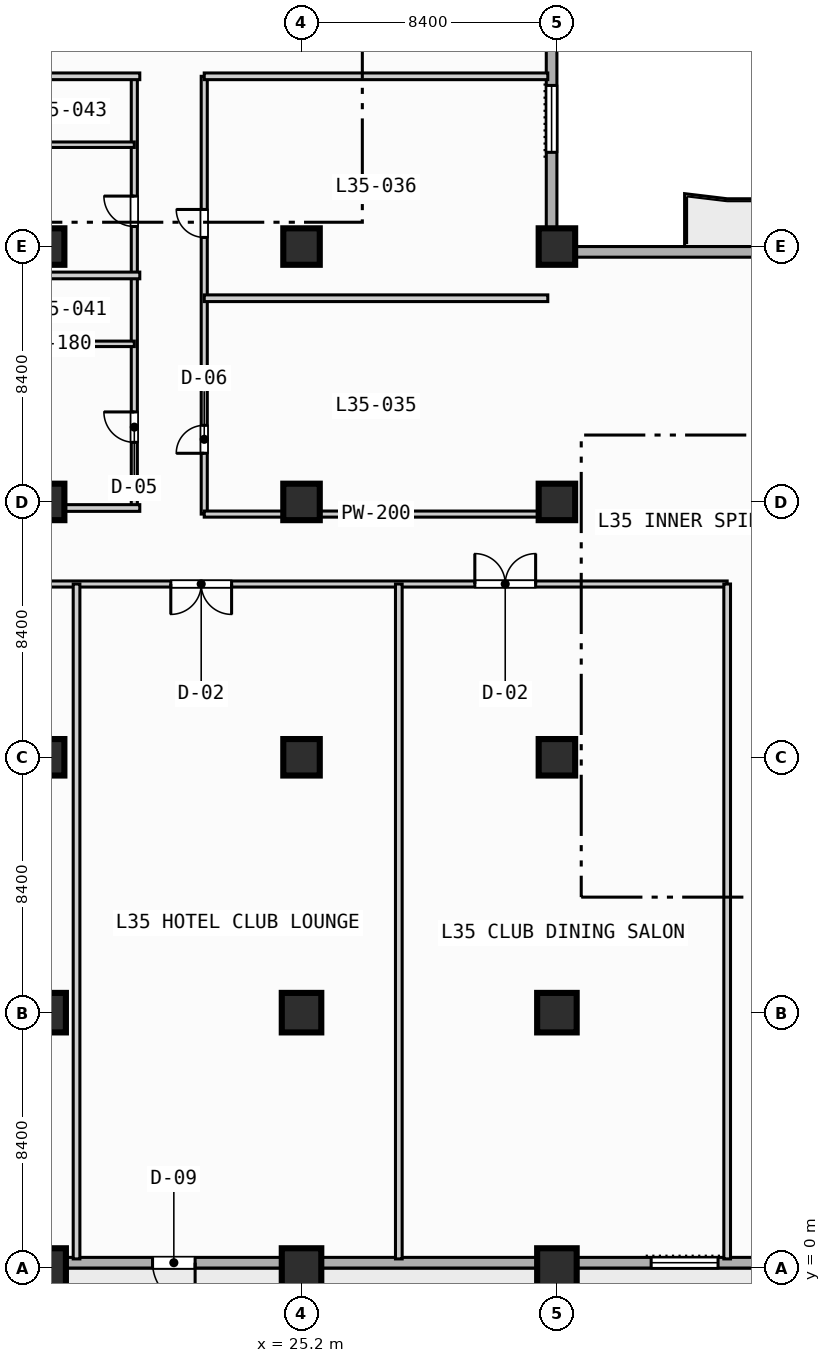
"""IFC4 building model, lengths in metres.
Left out: names, types, materials, properties, quantities, classifications, styles, units other than length and angle.
Written with IfcOpenShell. Run it as: python <this file> out.ifc"""

import sys

from ifc_helpers import new_model, si_unit, direction, frame, frame_2d, origin, origin_2d, place, context, subcontext, project, spatial, rectangle, extrude, element, fill, save


model = new_model("IFC4")
c1 = context("Model", 3, precision=1e-05, world=origin(), true_north=direction((0.0, 1.0)))
c2 = subcontext(c1, "Body", "Model", "MODEL_VIEW")
j1 = project(units=[si_unit("LENGTHUNIT", "METRE"), si_unit("PLANEANGLEUNIT", "RADIAN")], contexts=[c1])
p1 = place(None, origin())
s1 = spatial("IfcSite", under=j1, at=p1, CompositionType="ELEMENT")
p2 = place(p1, origin())
s2 = spatial("IfcBuilding", under=s1, at=p2, CompositionType="ELEMENT")
p3 = place(p2, frame((0.0, 0.0, 145.6)))
s3 = spatial("IfcBuildingStorey", under=s2, at=p3, CompositionType="ELEMENT", Elevation=145.6)
for number, where, z_axis, x_axis in (
    (1, (16.8, 0.0, 0.0), (0.0, 0.0, 1.0), (1.0, 0.0, 0.0)),
    (2, (16.8, 8.4, 0.0), (0.0, 0.0, 1.0), (1.0, 0.0, 0.0)),
):
    element("IfcColumn", number, at=place(p3, frame(where, z_axis=z_axis, x_axis=x_axis)), inside=s3, PredefinedType="COLUMN", context=c2, shape_type="SweptSolid", body=[
        extrude(rectangle(XDim=1.3, YDim=1.3, at=origin_2d()), origin(), (0.0, 0.0, 1.0), 3.8),
    ])
for number, where, z_axis, x_axis in (
    (3, (16.8, 16.8, 0.0), (0.0, 0.0, 1.0), (1.0, 0.0, 0.0)),
    (4, (16.8, 25.2, 0.0), (0.0, 0.0, 1.0), (1.0, 0.0, 0.0)),
    (5, (16.8, 33.6, 0.0), (0.0, 0.0, 1.0), (1.0, 0.0, 0.0)),
):
    element("IfcColumn", number, at=place(p3, frame(where, z_axis=z_axis, x_axis=x_axis)), inside=s3, PredefinedType="COLUMN", context=c2, shape_type="SweptSolid", body=[
        extrude(rectangle(XDim=1.2, YDim=1.2, at=origin_2d()), origin(), (0.0, 0.0, 1.0), 3.8),
    ])
for number, where, z_axis, x_axis in (
    (6, (25.2, 0.0, 0.0), (0.0, 0.0, 1.0), (1.0, 0.0, 0.0)),
    (7, (25.2, 8.4, 0.0), (0.0, 0.0, 1.0), (1.0, 0.0, 0.0)),
):
    element("IfcColumn", number, at=place(p3, frame(where, z_axis=z_axis, x_axis=x_axis)), inside=s3, PredefinedType="COLUMN", context=c2, shape_type="SweptSolid", body=[
        extrude(rectangle(XDim=1.3, YDim=1.3, at=origin_2d()), origin(), (0.0, 0.0, 1.0), 3.8),
    ])
for number, where, z_axis, x_axis in (
    (8, (25.2, 16.8, 0.0), (0.0, 0.0, 1.0), (1.0, 0.0, 0.0)),
    (9, (25.2, 25.2, 0.0), (0.0, 0.0, 1.0), (1.0, 0.0, 0.0)),
    (10, (25.2, 33.6, 0.0), (0.0, 0.0, 1.0), (1.0, 0.0, 0.0)),
):
    element("IfcColumn", number, at=place(p3, frame(where, z_axis=z_axis, x_axis=x_axis)), inside=s3, PredefinedType="COLUMN", context=c2, shape_type="SweptSolid", body=[
        extrude(rectangle(XDim=1.2, YDim=1.2, at=origin_2d()), origin(), (0.0, 0.0, 1.0), 3.8),
    ])
for number, where, z_axis, x_axis in (
    (11, (33.6, 0.0, 0.0), (0.0, 0.0, 1.0), (1.0, 0.0, 0.0)),
    (12, (33.6, 8.4, 0.0), (0.0, 0.0, 1.0), (1.0, 0.0, 0.0)),
):
    element("IfcColumn", number, at=place(p3, frame(where, z_axis=z_axis, x_axis=x_axis)), inside=s3, PredefinedType="COLUMN", context=c2, shape_type="SweptSolid", body=[
        extrude(rectangle(XDim=1.3, YDim=1.3, at=origin_2d()), origin(), (0.0, 0.0, 1.0), 3.8),
    ])
for number, where, z_axis, x_axis in (
    (13, (33.6, 16.8, 0.0), (0.0, 0.0, 1.0), (1.0, 0.0, 0.0)),
    (14, (33.6, 25.2, 0.0), (0.0, 0.0, 1.0), (1.0, 0.0, 0.0)),
    (15, (33.6, 33.6, 0.0), (0.0, 0.0, 1.0), (1.0, 0.0, 0.0)),
):
    element("IfcColumn", number, at=place(p3, frame(where, z_axis=z_axis, x_axis=x_axis)), inside=s3, PredefinedType="COLUMN", context=c2, shape_type="SweptSolid", body=[
        extrude(rectangle(XDim=1.2, YDim=1.2, at=origin_2d()), origin(), (0.0, 0.0, 1.0), 3.8),
    ])
p4 = place(p3, frame((33.425, 89.225, 0.0), z_axis=(0.0, 0.0, 1.0), x_axis=(0.0, -1.0, 0.0)))
e16 = element("IfcWall", 16, at=p4, inside=s3, PredefinedType="STANDARD", context=c2, shape_type="SweptSolid", body=[
    extrude(rectangle(XDim=55.8, YDim=0.35, at=frame_2d((27.9, 0.0))), origin(), (0.0, 0.0, 1.0), 3.55),
])
p5 = place(p4, frame((50.325, 0.0, 0.85)))
e17 = element("IfcOpeningElement", 17, at=p5, cuts=e16, PredefinedType="OPENING", context=c2, shape_type="SweptSolid", body=[
    extrude(rectangle(XDim=2.2, YDim=1.8, at=frame_2d((1.1, 0.9))), frame((0.0, 0.185, 0.0), z_axis=(0.0, -1.0, 0.0), x_axis=(1.0, 0.0, 0.0)), (0.0, 0.0, 1.0), 0.37),
])
p6 = place(p4, frame((33.525, 0.0, 0.85)))
e18 = element("IfcOpeningElement", 18, at=p6, cuts=e16, PredefinedType="OPENING", context=c2, shape_type="SweptSolid", body=[
    extrude(rectangle(XDim=2.2, YDim=1.8, at=frame_2d((1.1, 0.9))), frame((0.0, 0.185, 0.0), z_axis=(0.0, -1.0, 0.0), x_axis=(1.0, 0.0, 0.0)), (0.0, 0.0, 1.0), 0.37),
])
p7 = place(p4, frame((25.125, 0.0, 0.85)))
e19 = element("IfcOpeningElement", 19, at=p7, cuts=e16, PredefinedType="OPENING", context=c2, shape_type="SweptSolid", body=[
    extrude(rectangle(XDim=2.2, YDim=1.8, at=frame_2d((1.1, 0.9))), frame((0.0, 0.185, 0.0), z_axis=(0.0, -1.0, 0.0), x_axis=(1.0, 0.0, 0.0)), (0.0, 0.0, 1.0), 0.37),
])
p8 = place(p4, frame((16.725, 0.0, 0.85)))
e20 = element("IfcOpeningElement", 20, at=p8, cuts=e16, PredefinedType="OPENING", context=c2, shape_type="SweptSolid", body=[
    extrude(rectangle(XDim=2.2, YDim=1.8, at=frame_2d((1.1, 0.9))), frame((0.0, 0.185, 0.0), z_axis=(0.0, -1.0, 0.0), x_axis=(1.0, 0.0, 0.0)), (0.0, 0.0, 1.0), 0.37),
])
p9 = place(p4, frame((8.325, 0.0, 0.85)))
e21 = element("IfcOpeningElement", 21, at=p9, cuts=e16, PredefinedType="OPENING", context=c2, shape_type="SweptSolid", body=[
    extrude(rectangle(XDim=2.2, YDim=1.8, at=frame_2d((1.1, 0.9))), frame((0.0, 0.185, 0.0), z_axis=(0.0, -1.0, 0.0), x_axis=(1.0, 0.0, 0.0)), (0.0, 0.0, 1.0), 0.37),
])
p10 = place(p3, frame((33.425, 33.425, 0.0), z_axis=(0.0, 0.0, 1.0), x_axis=(1.0, 0.0, 0.0)))
e22 = element("IfcWall", 22, at=p10, inside=s3, PredefinedType="STANDARD", context=c2, shape_type="SweptSolid", body=[
    extrude(rectangle(XDim=39.0, YDim=0.35, at=frame_2d((19.5, 0.0))), origin(), (0.0, 0.0, 1.0), 3.55),
])
p11 = place(p10, frame((12.075, 0.0, 0.0)))
e23 = element("IfcOpeningElement", 23, at=p11, cuts=e22, PredefinedType="OPENING", context=c2, shape_type="SweptSolid", body=[
    extrude(rectangle(XDim=1.4, YDim=2.2, at=frame_2d((0.7, 1.1))), frame((0.0, 0.185, 0.0), z_axis=(0.0, -1.0, 0.0), x_axis=(1.0, 0.0, 0.0)), (0.0, 0.0, 1.0), 0.37),
])
p12 = place(p10, frame((20.075, 0.0, 0.85)))
e24 = element("IfcOpeningElement", 24, at=p12, cuts=e22, PredefinedType="OPENING", context=c2, shape_type="SweptSolid", body=[
    extrude(rectangle(XDim=2.2, YDim=1.8, at=frame_2d((1.1, 0.9))), frame((0.0, 0.185, 0.0), z_axis=(0.0, -1.0, 0.0), x_axis=(1.0, 0.0, 0.0)), (0.0, 0.0, 1.0), 0.37),
])
p13 = place(p10, frame((28.475, 0.0, 0.85)))
e25 = element("IfcOpeningElement", 25, at=p13, cuts=e22, PredefinedType="OPENING", context=c2, shape_type="SweptSolid", body=[
    extrude(rectangle(XDim=2.2, YDim=1.8, at=frame_2d((1.1, 0.9))), frame((0.0, 0.185, 0.0), z_axis=(0.0, -1.0, 0.0), x_axis=(1.0, 0.0, 0.0)), (0.0, 0.0, 1.0), 0.37),
])
p14 = place(p3, frame((72.425, 0.175, 0.0), z_axis=(0.0, 0.0, 1.0), x_axis=(-1.0, 0.0, 0.0)))
e26 = element("IfcWall", 26, at=p14, inside=s3, PredefinedType="STANDARD", context=c2, shape_type="SweptSolid", body=[
    extrude(rectangle(XDim=69.25, YDim=0.35, at=frame_2d((34.625, 0.0))), origin(), (0.0, 0.0, 1.0), 3.55),
])
p15 = place(p14, frame((50.725, 0.0, 0.0)))
e27 = element("IfcOpeningElement", 27, at=p15, cuts=e26, PredefinedType="OPENING", context=c2, shape_type="SweptSolid", body=[
    extrude(rectangle(XDim=1.4, YDim=2.2, at=frame_2d((0.7, 1.1))), frame((0.0, 0.185, 0.0), z_axis=(0.0, -1.0, 0.0), x_axis=(1.0, 0.0, 0.0)), (0.0, 0.0, 1.0), 0.37),
])
p16 = place(p14, frame((58.725, 0.0, 0.85)))
e28 = element("IfcOpeningElement", 28, at=p16, cuts=e26, PredefinedType="OPENING", context=c2, shape_type="SweptSolid", body=[
    extrude(rectangle(XDim=2.2, YDim=1.8, at=frame_2d((1.1, 0.9))), frame((0.0, 0.185, 0.0), z_axis=(0.0, -1.0, 0.0), x_axis=(1.0, 0.0, 0.0)), (0.0, 0.0, 1.0), 0.37),
])
p17 = place(p14, frame((33.525, 0.0, 0.85)))
e29 = element("IfcOpeningElement", 29, at=p17, cuts=e26, PredefinedType="OPENING", context=c2, shape_type="SweptSolid", body=[
    extrude(rectangle(XDim=2.2, YDim=1.8, at=frame_2d((1.1, 0.9))), frame((0.0, 0.185, 0.0), z_axis=(0.0, -1.0, 0.0), x_axis=(1.0, 0.0, 0.0)), (0.0, 0.0, 1.0), 0.37),
])
p18 = place(p14, frame((25.125, 0.0, 0.85)))
e30 = element("IfcOpeningElement", 30, at=p18, cuts=e26, PredefinedType="OPENING", context=c2, shape_type="SweptSolid", body=[
    extrude(rectangle(XDim=2.2, YDim=1.8, at=frame_2d((1.1, 0.9))), frame((0.0, 0.185, 0.0), z_axis=(0.0, -1.0, 0.0), x_axis=(1.0, 0.0, 0.0)), (0.0, 0.0, 1.0), 0.37),
])
p19 = place(p14, frame((8.325, 0.0, 0.85)))
e31 = element("IfcOpeningElement", 31, at=p19, cuts=e26, PredefinedType="OPENING", context=c2, shape_type="SweptSolid", body=[
    extrude(rectangle(XDim=2.2, YDim=1.8, at=frame_2d((1.1, 0.9))), frame((0.0, 0.185, 0.0), z_axis=(0.0, -1.0, 0.0), x_axis=(1.0, 0.0, 0.0)), (0.0, 0.0, 1.0), 0.37),
])
p20 = place(p14, frame((2.125, 0.0, 0.85)))
e32 = element("IfcOpeningElement", 32, at=p20, cuts=e26, PredefinedType="OPENING", context=c2, shape_type="SweptSolid", body=[
    extrude(rectangle(XDim=1.8, YDim=1.8, at=frame_2d((0.9, 0.9))), frame((0.0, 0.185, 0.0), z_axis=(0.0, -1.0, 0.0), x_axis=(1.0, 0.0, 0.0)), (0.0, 0.0, 1.0), 0.37),
])
p21 = place(p3, frame((22.0, 24.8, 0.0), z_axis=(0.0, 0.0, 1.0), x_axis=(0.0, 1.0, 0.0)))
e33 = element("IfcWall", 33, at=p21, inside=s3, PredefinedType="PARTITIONING", context=c2, shape_type="SweptSolid", body=[
    extrude(rectangle(XDim=14.4, YDim=0.2, at=frame_2d((7.2, 0.0))), origin(), (0.0, 0.0, 1.0), 3.55),
])
p22 = place(p21, frame((2.0, 0.0, 0.0)))
e34 = element("IfcOpeningElement", 34, at=p22, cuts=e33, PredefinedType="OPENING", context=c2, shape_type="SweptSolid", body=[
    extrude(rectangle(XDim=0.92, YDim=2.1, at=frame_2d((0.46, 1.05))), frame((0.0, 0.11, 0.0), z_axis=(0.0, -1.0, 0.0), x_axis=(1.0, 0.0, 0.0)), (0.0, 0.0, 1.0), 0.22),
])
p23 = place(p21, frame((9.1, 0.0, 0.0)))
e35 = element("IfcOpeningElement", 35, at=p23, cuts=e33, PredefinedType="OPENING", context=c2, shape_type="SweptSolid", body=[
    extrude(rectangle(XDim=0.92, YDim=2.1, at=frame_2d((0.46, 1.05))), frame((0.0, 0.11, 0.0), z_axis=(0.0, -1.0, 0.0), x_axis=(1.0, 0.0, 0.0)), (0.0, 0.0, 1.0), 0.22),
])
p24 = place(p3, frame((22.0, 24.8, 0.0), z_axis=(0.0, 0.0, 1.0), x_axis=(1.0, 0.0, 0.0)))
e36 = element("IfcWall", 36, at=p24, inside=s3, PredefinedType="PARTITIONING", context=c2, shape_type="SweptSolid", body=[
    extrude(rectangle(XDim=11.3, YDim=0.2, at=frame_2d((5.65, 0.0))), origin(), (0.0, 0.0, 1.0), 3.55),
])
for number, where, z_axis, x_axis in (
    (37, (22.0, 31.9, 0.0), (0.0, 0.0, 1.0), (1.0, 0.0, 0.0)),
    (38, (22.0, 39.2, 0.0), (0.0, 0.0, 1.0), (1.0, 0.0, 0.0)),
):
    element("IfcWall", number, at=place(p3, frame(where, z_axis=z_axis, x_axis=x_axis)), inside=s3, PredefinedType="PARTITIONING", context=c2, shape_type="SweptSolid", body=[
        extrude(rectangle(XDim=11.3, YDim=0.22, at=frame_2d((5.65, 0.0))), origin(), (0.0, 0.0, 1.0), 3.55),
    ])
p25 = place(p3, frame((3.4, 22.5, 0.0), z_axis=(0.0, 0.0, 1.0), x_axis=(1.0, 0.0, 0.0)))
e39 = element("IfcWall", 39, at=p25, inside=s3, PredefinedType="PARTITIONING", context=c2, shape_type="SweptSolid", body=[
    extrude(rectangle(XDim=35.8, YDim=0.2, at=frame_2d((17.9, 0.0))), origin(), (0.0, 0.0, 1.0), 3.55),
])
p26 = place(p25, frame((4.0, 0.0, 0.0)))
e40 = element("IfcOpeningElement", 40, at=p26, cuts=e39, PredefinedType="OPENING", context=c2, shape_type="SweptSolid", body=[
    extrude(rectangle(XDim=0.92, YDim=2.1, at=frame_2d((0.46, 1.05))), frame((0.0, 0.11, 0.0), z_axis=(0.0, -1.0, 0.0), x_axis=(1.0, 0.0, 0.0)), (0.0, 0.0, 1.0), 0.22),
])
p27 = place(p25, frame((17.5, 0.0, 0.0)))
e41 = element("IfcOpeningElement", 41, at=p27, cuts=e39, PredefinedType="OPENING", context=c2, shape_type="SweptSolid", body=[
    extrude(rectangle(XDim=2.0, YDim=2.15, at=frame_2d((1.0, 1.075))), frame((0.0, 0.11, 0.0), z_axis=(0.0, -1.0, 0.0), x_axis=(1.0, 0.0, 0.0)), (0.0, 0.0, 1.0), 0.22),
])
p28 = place(p25, frame((27.5, 0.0, 0.0)))
e42 = element("IfcOpeningElement", 42, at=p28, cuts=e39, PredefinedType="OPENING", context=c2, shape_type="SweptSolid", body=[
    extrude(rectangle(XDim=2.0, YDim=2.15, at=frame_2d((1.0, 1.075))), frame((0.0, 0.11, 0.0), z_axis=(0.0, -1.0, 0.0), x_axis=(1.0, 0.0, 0.0)), (0.0, 0.0, 1.0), 0.22),
])
for number, where, z_axis, x_axis in (
    (43, (17.8, 0.3, 0.0), (0.0, 0.0, 1.0), (0.0, 1.0, 0.0)),
    (44, (28.4, 0.3, 0.0), (0.0, 0.0, 1.0), (0.0, 1.0, 0.0)),
    (45, (39.2, 0.3, 0.0), (0.0, 0.0, 1.0), (0.0, 1.0, 0.0)),
):
    element("IfcWall", number, at=place(p3, frame(where, z_axis=z_axis, x_axis=x_axis)), inside=s3, PredefinedType="PARTITIONING", context=c2, shape_type="SweptSolid", body=[
        extrude(rectangle(XDim=22.2, YDim=0.22, at=frame_2d((11.1, 0.0))), origin(), (0.0, 0.0, 1.0), 3.55),
    ])
p29 = place(p3, frame((19.7, 25.0, 0.0), z_axis=(0.0, 0.0, 1.0), x_axis=(0.0, 1.0, 0.0)))
e46 = element("IfcWall", 46, at=p29, inside=s3, PredefinedType="PARTITIONING", context=c2, shape_type="SweptSolid", body=[
    extrude(rectangle(XDim=14.2, YDim=0.2, at=frame_2d((7.1, 0.0))), origin(), (0.0, 0.0, 1.0), 3.55),
])
p30 = place(p29, frame((2.16, 0.0, 0.0)))
e47 = element("IfcOpeningElement", 47, at=p30, cuts=e46, PredefinedType="OPENING", context=c2, shape_type="SweptSolid", body=[
    extrude(rectangle(XDim=1.0, YDim=2.15, at=frame_2d((0.5, 1.075))), frame((0.0, 0.11, 0.0), z_axis=(0.0, -1.0, 0.0), x_axis=(1.0, 0.0, 0.0)), (0.0, 0.0, 1.0), 0.22),
])
p31 = place(p29, frame((9.26, 0.0, 0.0)))
e48 = element("IfcOpeningElement", 48, at=p31, cuts=e46, PredefinedType="OPENING", context=c2, shape_type="SweptSolid", body=[
    extrude(rectangle(XDim=1.0, YDim=2.15, at=frame_2d((0.5, 1.075))), frame((0.0, 0.11, 0.0), z_axis=(0.0, -1.0, 0.0), x_axis=(1.0, 0.0, 0.0)), (0.0, 0.0, 1.0), 0.22),
])
p32 = place(p3, frame((0.2, 25.0, 0.0), z_axis=(0.0, 0.0, 1.0), x_axis=(1.0, 0.0, 0.0)))
e49 = element("IfcWall", 49, at=p32, inside=s3, PredefinedType="PARTITIONING", context=c2, shape_type="SweptSolid", body=[
    extrude(rectangle(XDim=19.68, YDim=0.22, at=frame_2d((9.84, 0.0))), origin(), (0.0, 0.0, 1.0), 2.8),
])
p33 = place(p3, frame((14.6, 30.4, 0.0), z_axis=(0.0, 0.0, 1.0), x_axis=(1.0, 0.0, 0.0)))
e50 = element("IfcWall", 50, at=p33, inside=s3, PredefinedType="PLUMBINGWALL", context=c2, shape_type="SweptSolid", body=[
    extrude(rectangle(XDim=5.1, YDim=0.18, at=frame_2d((2.55, 0.0))), origin(), (0.0, 0.0, 1.0), 3.55),
])
for number, where, z_axis, x_axis in (
    (51, (0.2, 32.65, 0.0), (0.0, 0.0, 1.0), (1.0, 0.0, 0.0)),
    (52, (0.2, 39.2, 0.0), (0.0, 0.0, 1.0), (1.0, 0.0, 0.0)),
):
    element("IfcWall", number, at=place(p3, frame(where, z_axis=z_axis, x_axis=x_axis)), inside=s3, PredefinedType="PARTITIONING", context=c2, shape_type="SweptSolid", body=[
        extrude(rectangle(XDim=19.68, YDim=0.22, at=frame_2d((9.84, 0.0))), origin(), (0.0, 0.0, 1.0), 3.55),
    ])
p34 = place(p3, frame((14.6, 36.95, 0.0), z_axis=(0.0, 0.0, 1.0), x_axis=(1.0, 0.0, 0.0)))
e53 = element("IfcWall", 53, at=p34, inside=s3, PredefinedType="PLUMBINGWALL", context=c2, shape_type="SweptSolid", body=[
    extrude(rectangle(XDim=5.1, YDim=0.18, at=frame_2d((2.55, 0.0))), origin(), (0.0, 0.0, 1.0), 3.55),
])
p35 = place(p5, origin())
e54 = element("IfcWindow", 54, at=p35, inside=s3, PartitioningType="SINGLE_PANEL", PredefinedType="WINDOW", context=c2, shape_type="SweptSolid", body=[
    extrude(rectangle(XDim=2.2, YDim=1.8, at=frame_2d((1.1, 0.9))), frame((0.0, 0.03, 0.0), z_axis=(0.0, -1.0, 0.0), x_axis=(1.0, 0.0, 0.0)), (0.0, 0.0, 1.0), 0.06),
])
fill(e17, e54)
p36 = place(p15, origin())
e55 = element("IfcDoor", 55, at=p36, inside=s3, OperationType="SINGLE_SWING_LEFT", PredefinedType="DOOR", context=c2, shape_type="SweptSolid", body=[
    extrude(rectangle(XDim=1.4, YDim=2.2, at=frame_2d((0.7, 1.1))), frame((0.0, 0.025, 0.0), z_axis=(0.0, -1.0, 0.0), x_axis=(1.0, 0.0, 0.0)), (0.0, 0.0, 1.0), 0.05),
])
fill(e27, e55)
p37 = place(p17, origin())
e56 = element("IfcWindow", 56, at=p37, inside=s3, PartitioningType="SINGLE_PANEL", PredefinedType="WINDOW", context=c2, shape_type="SweptSolid", body=[
    extrude(rectangle(XDim=2.2, YDim=1.8, at=frame_2d((1.1, 0.9))), frame((0.0, 0.03, 0.0), z_axis=(0.0, -1.0, 0.0), x_axis=(1.0, 0.0, 0.0)), (0.0, 0.0, 1.0), 0.06),
])
fill(e29, e56)
p38 = place(p22, origin())
e57 = element("IfcDoor", 57, at=p38, inside=s3, OperationType="SINGLE_SWING_LEFT", PredefinedType="DOOR", context=c2, shape_type="SweptSolid", body=[
    extrude(rectangle(XDim=0.92, YDim=2.1, at=frame_2d((0.46, 1.05))), frame((0.0, 0.025, 0.0), z_axis=(0.0, -1.0, 0.0), x_axis=(1.0, 0.0, 0.0)), (0.0, 0.0, 1.0), 0.05),
])
fill(e34, e57)
p39 = place(p23, origin())
e58 = element("IfcDoor", 58, at=p39, inside=s3, OperationType="SINGLE_SWING_RIGHT", PredefinedType="DOOR", context=c2, shape_type="SweptSolid", body=[
    extrude(rectangle(XDim=0.92, YDim=2.1, at=frame_2d((0.46, 1.05))), frame((0.0, 0.025, 0.0), z_axis=(0.0, -1.0, 0.0), x_axis=(1.0, 0.0, 0.0)), (0.0, 0.0, 1.0), 0.05),
])
fill(e35, e58)
p40 = place(p27, origin())
e59 = element("IfcDoor", 59, at=p40, inside=s3, OperationType="SINGLE_SWING_RIGHT", PredefinedType="DOOR", context=c2, shape_type="SweptSolid", body=[
    extrude(rectangle(XDim=2.0, YDim=2.15, at=frame_2d((1.0, 1.075))), frame((0.0, 0.025, 0.0), z_axis=(0.0, -1.0, 0.0), x_axis=(1.0, 0.0, 0.0)), (0.0, 0.0, 1.0), 0.05),
])
fill(e41, e59)
p41 = place(p28, origin())
e60 = element("IfcDoor", 60, at=p41, inside=s3, OperationType="SINGLE_SWING_LEFT", PredefinedType="DOOR", context=c2, shape_type="SweptSolid", body=[
    extrude(rectangle(XDim=2.0, YDim=2.15, at=frame_2d((1.0, 1.075))), frame((0.0, 0.025, 0.0), z_axis=(0.0, -1.0, 0.0), x_axis=(1.0, 0.0, 0.0)), (0.0, 0.0, 1.0), 0.05),
])
fill(e42, e60)
p42 = place(p30, origin())
e61 = element("IfcDoor", 61, at=p42, inside=s3, OperationType="SINGLE_SWING_RIGHT", PredefinedType="DOOR", context=c2, shape_type="SweptSolid", body=[
    extrude(rectangle(XDim=1.0, YDim=2.15, at=frame_2d((0.5, 1.075))), frame((0.0, 0.025, 0.0), z_axis=(0.0, -1.0, 0.0), x_axis=(1.0, 0.0, 0.0)), (0.0, 0.0, 1.0), 0.05),
])
fill(e47, e61)
p43 = place(p31, origin())
e62 = element("IfcDoor", 62, at=p43, inside=s3, OperationType="SINGLE_SWING_RIGHT", PredefinedType="DOOR", context=c2, shape_type="SweptSolid", body=[
    extrude(rectangle(XDim=1.0, YDim=2.15, at=frame_2d((0.5, 1.075))), frame((0.0, 0.025, 0.0), z_axis=(0.0, -1.0, 0.0), x_axis=(1.0, 0.0, 0.0)), (0.0, 0.0, 1.0), 0.05),
])
fill(e48, e62)
save(model, sys.argv[1])
